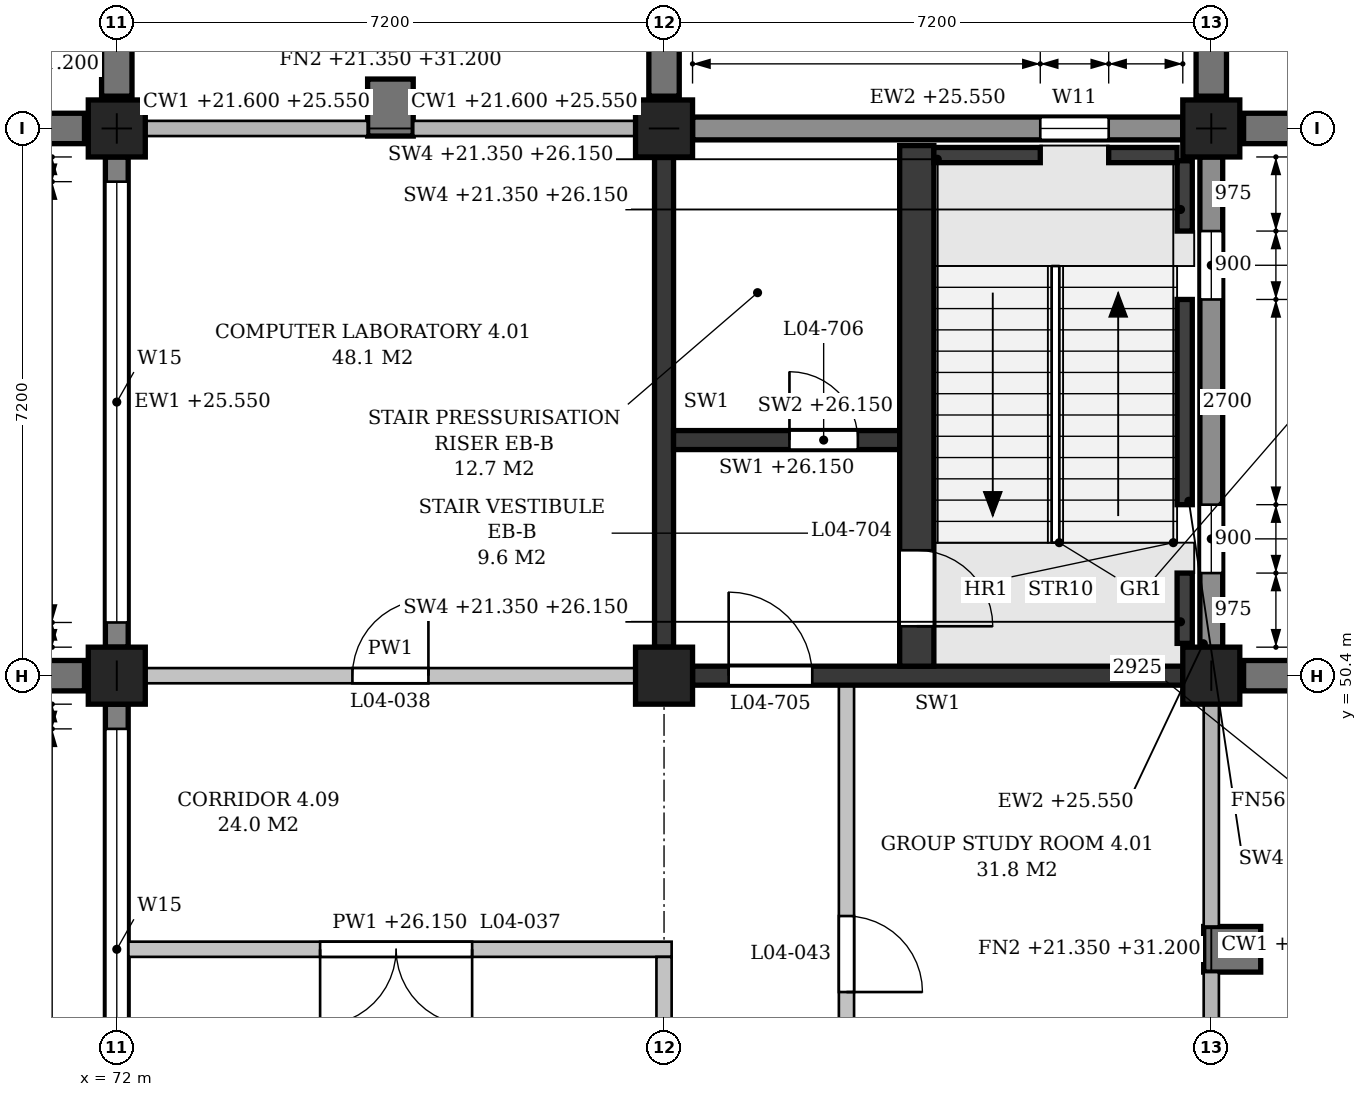
"""IFC4 building model, lengths in metres.
Left out: names, types, materials, properties, quantities, classifications, styles, units other than length and angle.
Written with IfcOpenShell. Run it as: python <this file> out.ifc"""

import sys

from ifc_helpers import new_model, si_unit, direction, frame, frame_2d, origin, origin_2d, place, context, subcontext, project, spatial, polyline, rectangle, outline, extrude, element, fill, save


model = new_model("IFC4")
c1 = context("Model", 3, precision=1e-05, world=origin(), true_north=direction((0.0, 1.0)))
c2 = subcontext(c1, "Body", "Model", "MODEL_VIEW")
j1 = project(units=[si_unit("LENGTHUNIT", "METRE"), si_unit("PLANEANGLEUNIT", "RADIAN")], contexts=[c1])
p1 = place(None, origin())
s1 = spatial("IfcSite", under=j1, at=p1, CompositionType="ELEMENT")
p2 = place(p1, origin())
s2 = spatial("IfcBuilding", under=s1, at=p2, CompositionType="ELEMENT")
p3 = place(p2, frame((0.0, 0.0, 21.6)))
s3 = spatial("IfcBuildingStorey", under=s2, at=p3, CompositionType="ELEMENT", Elevation=21.6)
for number, where, z_axis, x_axis in (
    (1, (72.0, 50.4, 0.0), (0.0, 0.0, 1.0), (1.0, 0.0, 0.0)),
    (2, (72.0, 57.6, 0.0), (0.0, 0.0, 1.0), (1.0, 0.0, 0.0)),
    (3, (79.2, 50.4, 0.0), (0.0, 0.0, 1.0), (1.0, 0.0, 0.0)),
    (4, (79.2, 57.6, 0.0), (0.0, 0.0, 1.0), (1.0, 0.0, 0.0)),
    (5, (86.4, 50.4, 0.0), (0.0, 0.0, 1.0), (1.0, 0.0, 0.0)),
    (6, (86.4, 57.6, 0.0), (0.0, 0.0, 1.0), (1.0, 0.0, 0.0)),
):
    element("IfcColumn", number, at=place(p3, frame(where, z_axis=z_axis, x_axis=x_axis)), inside=s3, PredefinedType="COLUMN", context=c2, shape_type="SweptSolid", body=[
        extrude(rectangle(XDim=0.75, YDim=0.75, at=origin_2d()), origin(), (0.0, 0.0, 1.0), 4.8),
    ])
p4 = place(p3, frame((86.4, 50.775, 0.0), z_axis=(0.0, 0.0, 1.0), x_axis=(0.0, 1.0, 0.0)))
e7 = element("IfcWall", 7, at=p4, inside=s3, PredefinedType="STANDARD", context=c2, shape_type="SweptSolid", body=[
    extrude(rectangle(XDim=6.45, YDim=0.3, at=frame_2d((3.225, 0.0))), origin(), (0.0, 0.0, 1.0), 3.95),
])
p5 = place(p4, frame((0.975, 0.0, 0.9)))
e8 = element("IfcOpeningElement", 8, at=p5, cuts=e7, PredefinedType="OPENING", context=c2, shape_type="SweptSolid", body=[
    extrude(outline(polyline([(0.0, 0.0), (0.9, 0.0), (0.9, 2.05), (0.45, 2.5), (0.0, 2.05), (0.0, 0.0)])), frame((0.0, 0.16, 0.0), z_axis=(0.0, -1.0, 0.0), x_axis=(1.0, 0.0, 0.0)), (0.0, 0.0, 1.0), 0.32),
])
p6 = place(p4, frame((4.575, 0.0, 0.9)))
e9 = element("IfcOpeningElement", 9, at=p6, cuts=e7, PredefinedType="OPENING", context=c2, shape_type="SweptSolid", body=[
    extrude(outline(polyline([(0.0, 0.0), (0.9, 0.0), (0.9, 2.05), (0.45, 2.5), (0.0, 2.05), (0.0, 0.0)])), frame((0.0, 0.16, 0.0), z_axis=(0.0, -1.0, 0.0), x_axis=(1.0, 0.0, 0.0)), (0.0, 0.0, 1.0), 0.32),
])
p7 = place(p3, frame((86.025, 57.6, 0.0), z_axis=(0.0, 0.0, 1.0), x_axis=(-1.0, 0.0, 0.0)))
e10 = element("IfcWall", 10, at=p7, inside=s3, PredefinedType="STANDARD", context=c2, shape_type="SweptSolid", body=[
    extrude(rectangle(XDim=6.45, YDim=0.3, at=frame_2d((3.225, 0.0))), origin(), (0.0, 0.0, 1.0), 3.95),
])
p8 = place(p7, frame((0.975, 0.0, 0.9)))
e11 = element("IfcOpeningElement", 11, at=p8, cuts=e10, PredefinedType="OPENING", context=c2, shape_type="SweptSolid", body=[
    extrude(outline(polyline([(0.0, 0.0), (0.9, 0.0), (0.9, 2.05), (0.45, 2.5), (0.0, 2.05), (0.0, 0.0)])), frame((0.0, 0.16, 0.0), z_axis=(0.0, -1.0, 0.0), x_axis=(1.0, 0.0, 0.0)), (0.0, 0.0, 1.0), 0.32),
])
p9 = place(p3, frame((72.0, 43.575, 0.0), z_axis=(0.0, 0.0, 1.0), x_axis=(0.0, 1.0, 0.0)))
e12 = element("IfcWall", 12, at=p9, inside=s3, PredefinedType="STANDARD", context=c2, shape_type="SweptSolid", body=[
    extrude(rectangle(XDim=6.45, YDim=0.3, at=frame_2d((3.225, 0.0))), origin(), (0.0, 0.0, 1.0), 3.95),
])
p10 = place(p9, frame((0.325, 0.0, 0.9)))
e13 = element("IfcOpeningElement", 13, at=p10, cuts=e12, PredefinedType="OPENING", context=c2, shape_type="SweptSolid", body=[
    extrude(outline(polyline([(0.0, 0.0), (5.8, 0.0), (5.8, 1.0), (2.9, 2.5), (0.0, 1.0), (0.0, 0.0)])), frame((0.0, 0.16, 0.0), z_axis=(0.0, -1.0, 0.0), x_axis=(1.0, 0.0, 0.0)), (0.0, 0.0, 1.0), 0.32),
])
p11 = place(p3, frame((72.0, 50.775, 0.0), z_axis=(0.0, 0.0, 1.0), x_axis=(0.0, 1.0, 0.0)))
e14 = element("IfcWall", 14, at=p11, inside=s3, PredefinedType="STANDARD", context=c2, shape_type="SweptSolid", body=[
    extrude(rectangle(XDim=6.45, YDim=0.3, at=frame_2d((3.225, 0.0))), origin(), (0.0, 0.0, 1.0), 3.95),
])
p12 = place(p11, frame((0.325, 0.0, 0.9)))
e15 = element("IfcOpeningElement", 15, at=p12, cuts=e14, PredefinedType="OPENING", context=c2, shape_type="SweptSolid", body=[
    extrude(outline(polyline([(0.0, 0.0), (5.8, 0.0), (5.8, 1.0), (2.9, 2.5), (0.0, 1.0), (0.0, 0.0)])), frame((0.0, 0.16, 0.0), z_axis=(0.0, -1.0, 0.0), x_axis=(1.0, 0.0, 0.0)), (0.0, 0.0, 1.0), 0.32),
])
for number, where, z_axis, x_axis in (
    (16, (86.3, 46.8, -0.25), (0.0, 0.0, 1.0), (1.0, 0.0, 0.0)),
    (17, (75.6, 57.5, -0.25), (0.0, 0.0, 1.0), (0.0, 1.0, 0.0)),
):
    element("IfcWall", number, at=place(p3, frame(where, z_axis=z_axis, x_axis=x_axis)), inside=s3, PredefinedType="POLYGONAL", context=c2, shape_type="SweptSolid", body=[
        extrude(outline(polyline([(0.75, 0.0), (0.75, 9.4), (0.45, 9.85), (0.3, 9.85), (0.3, 8.95), (0.0, 8.95), (0.0, 5.05), (0.35, 5.05), (0.35, 4.2), (0.0, 4.2), (0.0, 0.25), (0.35, 0.25), (0.35, 0.0), (0.75, 0.0)])), frame((0.0, 0.3, 0.0), z_axis=(0.0, -1.0, 0.0), x_axis=(1.0, 0.0, 0.0)), (0.0, 0.0, 1.0), 0.6),
    ])
for number, where, z_axis, x_axis in (
    (18, (71.575, 50.4, -0.25), (0.0, 0.0, 1.0), (-1.0, 0.0, 0.0)),
    (19, (71.575, 57.6, -0.25), (0.0, 0.0, 1.0), (-1.0, 0.0, 0.0)),
):
    element("IfcWall", number, at=place(p3, frame(where, z_axis=z_axis, x_axis=x_axis)), inside=s3, PredefinedType="POLYGONAL", context=c2, shape_type="SweptSolid", body=[
        extrude(outline(polyline([(0.6, 0.0), (0.6, 9.175), (0.15, 9.85), (0.0, 9.85), (0.0, 0.0), (0.6, 0.0)])), frame((0.0, 0.2, 0.0), z_axis=(0.0, -1.0, 0.0), x_axis=(1.0, 0.0, 0.0)), (0.0, 0.0, 1.0), 0.4),
    ])
for number, where, z_axis, x_axis in (
    (20, (72.0, 58.025, -0.25), (0.0, 0.0, 1.0), (0.0, 1.0, 0.0)),
    (21, (79.2, 58.025, -0.25), (0.0, 0.0, 1.0), (0.0, 1.0, 0.0)),
    (22, (86.825, 50.4, -0.25), (0.0, 0.0, 1.0), (1.0, 0.0, 0.0)),
    (23, (86.4, 58.025, -0.25), (0.0, 0.0, 1.0), (0.0, 1.0, 0.0)),
    (24, (86.825, 57.6, -0.25), (0.0, 0.0, 1.0), (1.0, 0.0, 0.0)),
):
    element("IfcWall", number, at=place(p3, frame(where, z_axis=z_axis, x_axis=x_axis)), inside=s3, PredefinedType="POLYGONAL", context=c2, shape_type="SweptSolid", body=[
        extrude(outline(polyline([(0.85, 0.0), (0.85, 8.8), (0.15, 9.85), (0.0, 9.85), (0.0, 0.0), (0.85, 0.0)])), frame((0.0, 0.2, 0.0), z_axis=(0.0, -1.0, 0.0), x_axis=(1.0, 0.0, 0.0)), (0.0, 0.0, 1.0), 0.4),
    ])
p13 = place(p3, frame((79.575, 50.4, 0.0), z_axis=(0.0, 0.0, 1.0), x_axis=(1.0, 0.0, 0.0)))
e25 = element("IfcWall", 25, at=p13, inside=s3, PredefinedType="SHEAR", context=c2, shape_type="SweptSolid", body=[
    extrude(rectangle(XDim=6.45, YDim=0.25, at=frame_2d((3.225, 0.0))), origin(), (0.0, 0.0, 1.0), 3.8),
])
p14 = place(p13, frame((0.475, 0.0, 0.0)))
e26 = element("IfcOpeningElement", 26, at=p14, cuts=e25, PredefinedType="OPENING", context=c2, shape_type="SweptSolid", body=[
    extrude(rectangle(XDim=1.1, YDim=2.1, at=frame_2d((0.55, 1.05))), frame((0.0, 0.135, 0.0), z_axis=(0.0, -1.0, 0.0), x_axis=(1.0, 0.0, 0.0)), (0.0, 0.0, 1.0), 0.27),
])
p15 = place(p3, frame((79.2, 50.775, 0.0), z_axis=(0.0, 0.0, 1.0), x_axis=(0.0, 1.0, 0.0)))
e27 = element("IfcWall", 27, at=p15, inside=s3, PredefinedType="SHEAR", context=c2, shape_type="SweptSolid", body=[
    extrude(rectangle(XDim=6.45, YDim=0.25, at=frame_2d((3.225, 0.0))), origin(), (0.0, 0.0, 1.0), 3.8),
])
p16 = place(p3, frame((86.05, 50.825, -0.25), z_axis=(0.0, 0.0, 1.0), x_axis=(0.0, 1.0, 0.0)))
e28 = element("IfcWall", 28, at=p16, inside=s3, PredefinedType="SHEAR", context=c2, shape_type="SweptSolid", body=[
    extrude(rectangle(XDim=0.925, YDim=0.2, at=frame_2d((0.462, 0.0))), origin(), (0.0, 0.0, 1.0), 4.8),
])
p17 = place(p3, frame((86.05, 52.65, -0.25), z_axis=(0.0, 0.0, 1.0), x_axis=(0.0, 1.0, 0.0)))
e29 = element("IfcWall", 29, at=p17, inside=s3, PredefinedType="SHEAR", context=c2, shape_type="SweptSolid", body=[
    extrude(rectangle(XDim=2.7, YDim=0.2, at=frame_2d((1.35, 0.0))), origin(), (0.0, 0.0, 1.0), 4.8),
])
p18 = place(p3, frame((86.05, 56.25, -0.25), z_axis=(0.0, 0.0, 1.0), x_axis=(0.0, 1.0, 0.0)))
e30 = element("IfcWall", 30, at=p18, inside=s3, PredefinedType="SHEAR", context=c2, shape_type="SweptSolid", body=[
    extrude(rectangle(XDim=0.925, YDim=0.2, at=frame_2d((0.462, 0.0))), origin(), (0.0, 0.0, 1.0), 4.8),
])
p19 = place(p3, frame((82.75, 57.25, -0.25), z_axis=(0.0, 0.0, 1.0), x_axis=(1.0, 0.0, 0.0)))
e31 = element("IfcWall", 31, at=p19, inside=s3, PredefinedType="SHEAR", context=c2, shape_type="SweptSolid", body=[
    extrude(rectangle(XDim=1.4, YDim=0.2, at=frame_2d((0.7, 0.0))), origin(), (0.0, 0.0, 1.0), 4.8),
])
p20 = place(p3, frame((85.05, 57.25, -0.25), z_axis=(0.0, 0.0, 1.0), x_axis=(1.0, 0.0, 0.0)))
e32 = element("IfcWall", 32, at=p20, inside=s3, PredefinedType="SHEAR", context=c2, shape_type="SweptSolid", body=[
    extrude(rectangle(XDim=0.9, YDim=0.2, at=frame_2d((0.45, 0.0))), origin(), (0.0, 0.0, 1.0), 4.8),
])
p21 = place(p3, frame((82.525, 50.525, 0.0), z_axis=(0.0, 0.0, 1.0), x_axis=(0.0, 1.0, 0.0)))
e33 = element("IfcWall", 33, at=p21, inside=s3, PredefinedType="SHEAR", context=c2, shape_type="SweptSolid", body=[
    extrude(rectangle(XDim=6.85, YDim=0.45, at=frame_2d((3.425, 0.0))), origin(), (0.0, 0.0, 1.0), 4.55),
])
p22 = place(p21, frame((0.525, 0.0, 0.0)))
e34 = element("IfcOpeningElement", 34, at=p22, cuts=e33, PredefinedType="OPENING", context=c2, shape_type="SweptSolid", body=[
    extrude(rectangle(XDim=1.0, YDim=2.1, at=frame_2d((0.5, 1.05))), frame((0.0, 0.235, 0.0), z_axis=(0.0, -1.0, 0.0), x_axis=(1.0, 0.0, 0.0)), (0.0, 0.0, 1.0), 0.47),
])
p23 = place(p3, frame((79.325, 53.5, 0.0), z_axis=(0.0, 0.0, 1.0), x_axis=(1.0, 0.0, 0.0)))
e35 = element("IfcWall", 35, at=p23, inside=s3, PredefinedType="SHEAR", context=c2, shape_type="SweptSolid", body=[
    extrude(rectangle(XDim=2.975, YDim=0.25, at=frame_2d((1.488, 0.0))), origin(), (0.0, 0.0, 1.0), 4.55),
])
p24 = place(p23, frame((1.525, 0.0, 0.0)))
e36 = element("IfcOpeningElement", 36, at=p24, cuts=e35, PredefinedType="OPENING", context=c2, shape_type="SweptSolid", body=[
    extrude(rectangle(XDim=0.9, YDim=2.1, at=frame_2d((0.45, 1.05))), frame((0.0, 0.135, 0.0), z_axis=(0.0, -1.0, 0.0), x_axis=(1.0, 0.0, 0.0)), (0.0, 0.0, 1.0), 0.27),
])
p25 = place(p3, frame((72.15, 46.8, 0.0), z_axis=(0.0, 0.0, 1.0), x_axis=(1.0, 0.0, 0.0)))
e37 = element("IfcWall", 37, at=p25, inside=s3, PredefinedType="PARTITIONING", context=c2, shape_type="SweptSolid", body=[
    extrude(outline(polyline([(0.0, 0.0), (7.15, 0.0), (7.15, 3.8), (6.8, 3.8), (6.8, 4.55), (0.1, 4.55), (0.1, 3.95), (0.0, 3.95), (0.0, 0.0)])), frame((0.0, 0.1, 0.0), z_axis=(0.0, -1.0, 0.0), x_axis=(1.0, 0.0, 0.0)), (0.0, 0.0, 1.0), 0.2),
])
p26 = place(p25, frame((2.525, 0.0, 0.0)))
e38 = element("IfcOpeningElement", 38, at=p26, cuts=e37, PredefinedType="OPENING", context=c2, shape_type="SweptSolid", body=[
    extrude(rectangle(XDim=2.0, YDim=2.1, at=frame_2d((1.0, 1.05))), frame((0.0, 0.11, 0.0), z_axis=(0.0, -1.0, 0.0), x_axis=(1.0, 0.0, 0.0)), (0.0, 0.0, 1.0), 0.22),
])
p27 = place(p3, frame((72.375, 50.4, 0.0), z_axis=(0.0, 0.0, 1.0), x_axis=(1.0, 0.0, 0.0)))
e39 = element("IfcWall", 39, at=p27, inside=s3, PredefinedType="PARTITIONING", context=c2, shape_type="SweptSolid", body=[
    extrude(rectangle(XDim=6.45, YDim=0.2, at=frame_2d((3.225, 0.0))), origin(), (0.0, 0.0, 1.0), 3.8),
])
p28 = place(p27, frame((2.725, 0.0, 0.0)))
e40 = element("IfcOpeningElement", 40, at=p28, cuts=e39, PredefinedType="OPENING", context=c2, shape_type="SweptSolid", body=[
    extrude(rectangle(XDim=1.0, YDim=2.1, at=frame_2d((0.5, 1.05))), frame((0.0, 0.11, 0.0), z_axis=(0.0, -1.0, 0.0), x_axis=(1.0, 0.0, 0.0)), (0.0, 0.0, 1.0), 0.22),
])
p29 = place(p3, frame((79.2, 43.575, 0.0), z_axis=(0.0, 0.0, 1.0), x_axis=(0.0, 1.0, 0.0)))
e41 = element("IfcWall", 41, at=p29, inside=s3, PredefinedType="PARTITIONING", context=c2, shape_type="SweptSolid", body=[
    extrude(rectangle(XDim=3.125, YDim=0.2, at=frame_2d((1.562, 0.0))), origin(), (0.0, 0.0, 1.0), 3.8),
])
p30 = place(p3, frame((81.6, 43.2, 0.0), z_axis=(0.0, 0.0, 1.0), x_axis=(0.0, 1.0, 0.0)))
e42 = element("IfcWall", 42, at=p30, inside=s3, PredefinedType="PARTITIONING", context=c2, shape_type="SweptSolid", body=[
    extrude(outline(polyline([(0.0, 0.0), (7.075, 0.0), (7.075, 3.8), (6.95, 3.8), (6.95, 4.55), (0.25, 4.55), (0.25, 3.8), (0.0, 3.8), (0.0, 0.0)])), frame((0.0, 0.1, 0.0), z_axis=(0.0, -1.0, 0.0), x_axis=(1.0, 0.0, 0.0)), (0.0, 0.0, 1.0), 0.2),
])
p31 = place(p30, frame((3.038, 0.0, 0.0)))
e43 = element("IfcOpeningElement", 43, at=p31, cuts=e42, PredefinedType="OPENING", context=c2, shape_type="SweptSolid", body=[
    extrude(rectangle(XDim=1.0, YDim=2.1, at=frame_2d((0.5, 1.05))), frame((0.0, 0.11, 0.0), z_axis=(0.0, -1.0, 0.0), x_axis=(1.0, 0.0, 0.0)), (0.0, 0.0, 1.0), 0.22),
])
p32 = place(p5, origin())
e44 = element("IfcWindow", 44, at=p32, inside=s3, PartitioningType="SINGLE_PANEL", PredefinedType="WINDOW", context=c2, shape_type="SweptSolid", body=[
    extrude(outline(polyline([(0.0, 0.0), (0.9, 0.0), (0.9, 2.05), (0.45, 2.5), (0.0, 2.05), (0.0, 0.0)])), frame((0.0, 0.03, 0.0), z_axis=(0.0, -1.0, 0.0), x_axis=(1.0, 0.0, 0.0)), (0.0, 0.0, 1.0), 0.06),
])
fill(e8, e44)
p33 = place(p6, origin())
e45 = element("IfcWindow", 45, at=p33, inside=s3, PartitioningType="SINGLE_PANEL", PredefinedType="WINDOW", context=c2, shape_type="SweptSolid", body=[
    extrude(outline(polyline([(0.0, 0.0), (0.9, 0.0), (0.9, 2.05), (0.45, 2.5), (0.0, 2.05), (0.0, 0.0)])), frame((0.0, 0.03, 0.0), z_axis=(0.0, -1.0, 0.0), x_axis=(1.0, 0.0, 0.0)), (0.0, 0.0, 1.0), 0.06),
])
fill(e9, e45)
p34 = place(p8, origin())
e46 = element("IfcWindow", 46, at=p34, inside=s3, PartitioningType="SINGLE_PANEL", PredefinedType="WINDOW", context=c2, shape_type="SweptSolid", body=[
    extrude(outline(polyline([(0.0, 0.0), (0.9, 0.0), (0.9, 2.05), (0.45, 2.5), (0.0, 2.05), (0.0, 0.0)])), frame((0.0, 0.03, 0.0), z_axis=(0.0, -1.0, 0.0), x_axis=(1.0, 0.0, 0.0)), (0.0, 0.0, 1.0), 0.06),
])
fill(e11, e46)
p35 = place(p10, origin())
e47 = element("IfcWindow", 47, at=p35, inside=s3, PartitioningType="TRIPLE_PANEL_VERTICAL", PredefinedType="WINDOW", context=c2, shape_type="SweptSolid", body=[
    extrude(outline(polyline([(0.0, 0.0), (5.8, 0.0), (5.8, 1.0), (2.9, 2.5), (0.0, 1.0), (0.0, 0.0)])), frame((0.0, 0.03, 0.0), z_axis=(0.0, -1.0, 0.0), x_axis=(1.0, 0.0, 0.0)), (0.0, 0.0, 1.0), 0.06),
])
fill(e13, e47)
p36 = place(p12, origin())
e48 = element("IfcWindow", 48, at=p36, inside=s3, PartitioningType="TRIPLE_PANEL_VERTICAL", PredefinedType="WINDOW", context=c2, shape_type="SweptSolid", body=[
    extrude(outline(polyline([(0.0, 0.0), (5.8, 0.0), (5.8, 1.0), (2.9, 2.5), (0.0, 1.0), (0.0, 0.0)])), frame((0.0, 0.03, 0.0), z_axis=(0.0, -1.0, 0.0), x_axis=(1.0, 0.0, 0.0)), (0.0, 0.0, 1.0), 0.06),
])
fill(e15, e48)
p37 = place(p22, frame((1.0, 0.0, 0.0), z_axis=(0.0, 0.0, 1.0), x_axis=(-1.0, 0.0, 0.0)))
e49 = element("IfcDoor", 49, at=p37, inside=s3, OperationType="SINGLE_SWING_RIGHT", PredefinedType="DOOR", context=c2, shape_type="SweptSolid", body=[
    extrude(rectangle(XDim=1.0, YDim=2.1, at=frame_2d((0.5, 1.05))), frame((0.0, 0.025, 0.0), z_axis=(0.0, -1.0, 0.0), x_axis=(1.0, 0.0, 0.0)), (0.0, 0.0, 1.0), 0.05),
])
fill(e34, e49)
p38 = place(p14, origin())
e50 = element("IfcDoor", 50, at=p38, inside=s3, OperationType="SINGLE_SWING_LEFT", PredefinedType="DOOR", context=c2, shape_type="SweptSolid", body=[
    extrude(rectangle(XDim=1.1, YDim=2.1, at=frame_2d((0.55, 1.05))), frame((0.0, 0.025, 0.0), z_axis=(0.0, -1.0, 0.0), x_axis=(1.0, 0.0, 0.0)), (0.0, 0.0, 1.0), 0.05),
])
fill(e26, e50)
p39 = place(p24, origin())
e51 = element("IfcDoor", 51, at=p39, inside=s3, OperationType="SINGLE_SWING_LEFT", PredefinedType="DOOR", context=c2, shape_type="SweptSolid", body=[
    extrude(rectangle(XDim=0.9, YDim=2.1, at=frame_2d((0.45, 1.05))), frame((0.0, 0.025, 0.0), z_axis=(0.0, -1.0, 0.0), x_axis=(1.0, 0.0, 0.0)), (0.0, 0.0, 1.0), 0.05),
])
fill(e36, e51)
p40 = place(p26, origin())
e52 = element("IfcDoor", 52, at=p40, inside=s3, OperationType="DOUBLE_DOOR_SINGLE_SWING", PredefinedType="DOOR", context=c2, shape_type="SweptSolid", body=[
    extrude(rectangle(XDim=2.0, YDim=2.1, at=frame_2d((1.0, 1.05))), frame((0.0, 0.025, 0.0), z_axis=(0.0, -1.0, 0.0), x_axis=(1.0, 0.0, 0.0)), (0.0, 0.0, 1.0), 0.05),
])
fill(e38, e52)
p41 = place(p28, origin())
e53 = element("IfcDoor", 53, at=p41, inside=s3, OperationType="SINGLE_SWING_RIGHT", PredefinedType="DOOR", context=c2, shape_type="SweptSolid", body=[
    extrude(rectangle(XDim=1.0, YDim=2.1, at=frame_2d((0.5, 1.05))), frame((0.0, 0.025, 0.0), z_axis=(0.0, -1.0, 0.0), x_axis=(1.0, 0.0, 0.0)), (0.0, 0.0, 1.0), 0.05),
])
fill(e40, e53)
p42 = place(p31, frame((1.0, 0.0, 0.0), z_axis=(0.0, 0.0, 1.0), x_axis=(-1.0, 0.0, 0.0)))
e54 = element("IfcDoor", 54, at=p42, inside=s3, OperationType="SINGLE_SWING_RIGHT", PredefinedType="DOOR", context=c2, shape_type="SweptSolid", body=[
    extrude(rectangle(XDim=1.0, YDim=2.1, at=frame_2d((0.5, 1.05))), frame((0.0, 0.025, 0.0), z_axis=(0.0, -1.0, 0.0), x_axis=(1.0, 0.0, 0.0)), (0.0, 0.0, 1.0), 0.05),
])
fill(e43, e54)
save(model, sys.argv[1])
